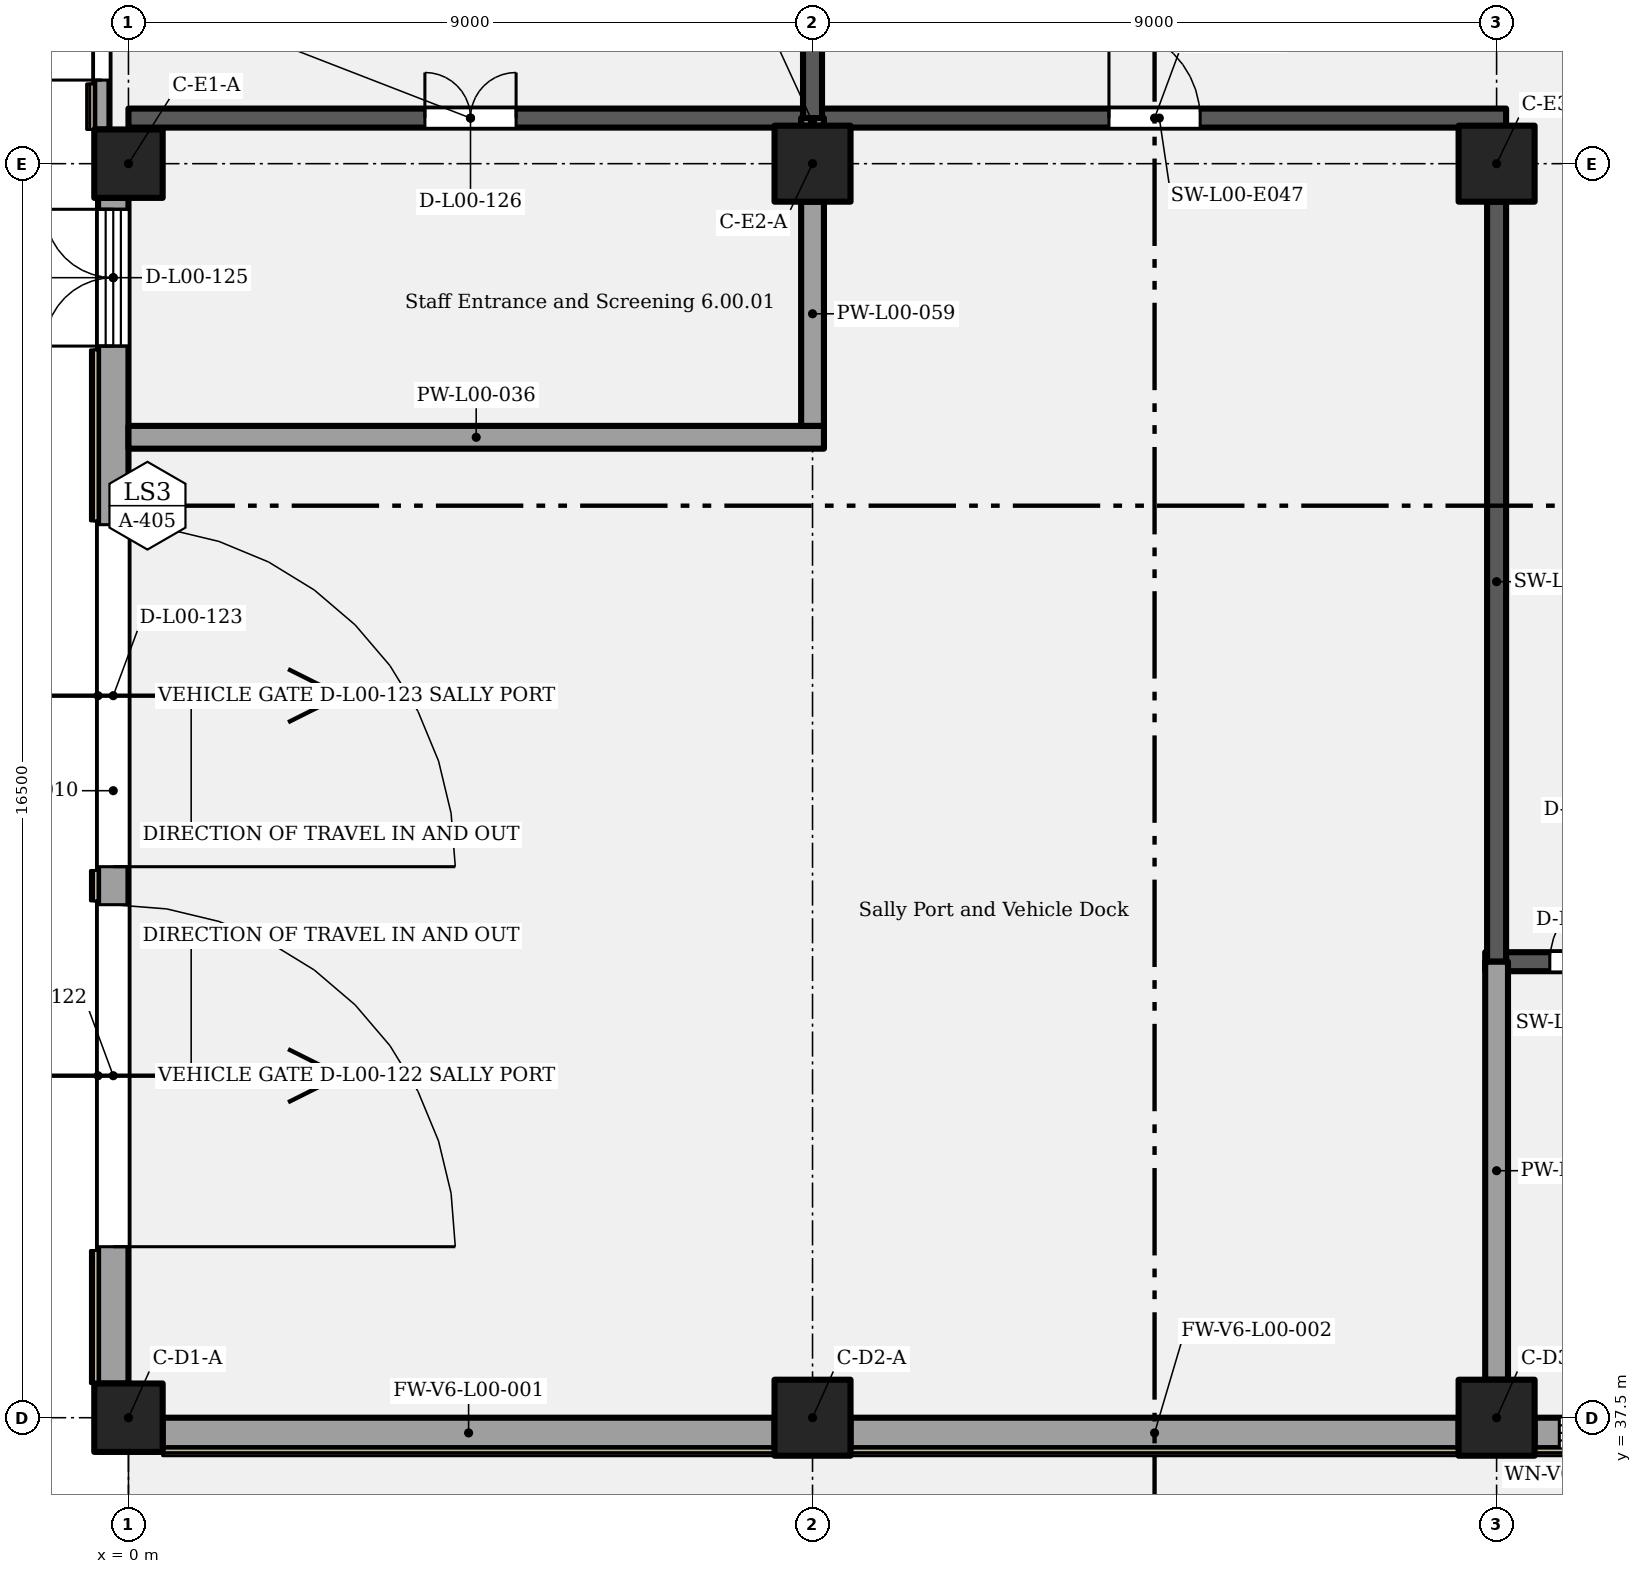
"""IFC4 building model, lengths in metres.
Left out: names, types, materials, properties, quantities, classifications, styles, units other than length and angle.
Written with IfcOpenShell. Run it as: python <this file> out.ifc"""

import sys

from ifc_helpers import new_model, si_unit, direction, frame, frame_2d, origin, origin_2d, place, context, subcontext, project, spatial, rectangle, extrude, element, fill, save


model = new_model("IFC4")
c1 = context("Model", 3, precision=1e-05, world=origin(), true_north=direction((0.0, 1.0)))
c2 = subcontext(c1, "Body", "Model", "MODEL_VIEW")
j1 = project(units=[si_unit("LENGTHUNIT", "METRE"), si_unit("PLANEANGLEUNIT", "RADIAN")], contexts=[c1])
p1 = place(None, origin())
s1 = spatial("IfcSite", under=j1, at=p1, CompositionType="ELEMENT")
p2 = place(p1, origin())
s2 = spatial("IfcBuilding", under=s1, at=p2, CompositionType="ELEMENT")
p3 = place(p2, origin())
s3 = spatial("IfcBuildingStorey", under=s2, at=p3, CompositionType="ELEMENT", Elevation=0.0)
p4 = place(p3, frame((0.0, 37.5, 0.0), z_axis=(0.0, 0.0, 1.0), x_axis=(1.0, 0.0, 0.0)))
e1 = element("IfcColumn", 1, at=p4, inside=s3, PredefinedType="COLUMN", context=c2, shape_type="SweptSolid", body=[
    extrude(rectangle(XDim=0.9, YDim=0.9, at=origin_2d()), origin(), (0.0, 0.0, 1.0), 6.6),
])
for number, where, z_axis, x_axis in (
    (2, (9.0, 37.5, 0.0), (0.0, 0.0, 1.0), (1.0, 0.0, 0.0)),
    (3, (18.0, 37.5, 0.0), (0.0, 0.0, 1.0), (1.0, 0.0, 0.0)),
):
    element("IfcColumn", number, at=place(p3, frame(where, z_axis=z_axis, x_axis=x_axis)), inside=s3, PredefinedType="COLUMN", context=c2, shape_type="SweptSolid", body=[
        extrude(rectangle(XDim=1.0, YDim=1.0, at=origin_2d()), origin(), (0.0, 0.0, 1.0), 6.6),
    ])
p5 = place(p3, frame((0.0, 54.0, 0.0), z_axis=(0.0, 0.0, 1.0), x_axis=(1.0, 0.0, 0.0)))
e4 = element("IfcColumn", 4, at=p5, inside=s3, PredefinedType="COLUMN", context=c2, shape_type="SweptSolid", body=[
    extrude(rectangle(XDim=0.9, YDim=0.9, at=origin_2d()), origin(), (0.0, 0.0, 1.0), 6.6),
])
for number, where, z_axis, x_axis in (
    (5, (9.0, 54.0, 0.0), (0.0, 0.0, 1.0), (1.0, 0.0, 0.0)),
    (6, (18.0, 54.0, 0.0), (0.0, 0.0, 1.0), (1.0, 0.0, 0.0)),
):
    element("IfcColumn", number, at=place(p3, frame(where, z_axis=z_axis, x_axis=x_axis)), inside=s3, PredefinedType="COLUMN", context=c2, shape_type="SweptSolid", body=[
        extrude(rectangle(XDim=1.0, YDim=1.0, at=origin_2d()), origin(), (0.0, 0.0, 1.0), 6.6),
    ])
p6 = place(p3, frame((0.45, 37.3, 0.0), z_axis=(0.0, 0.0, 1.0), x_axis=(1.0, 0.0, 0.0)))
e7 = element("IfcWall", 7, at=p6, inside=s3, PredefinedType="SOLIDWALL", context=c2, shape_type="SweptSolid", body=[
    extrude(rectangle(XDim=8.05, YDim=0.4, at=frame_2d((4.025, 0.0))), origin(), (0.0, 0.0, 1.0), 6.3),
])
p7 = place(p3, frame((9.5, 37.3, 0.0), z_axis=(0.0, 0.0, 1.0), x_axis=(1.0, 0.0, 0.0)))
e8 = element("IfcWall", 8, at=p7, inside=s3, PredefinedType="SOLIDWALL", context=c2, shape_type="SweptSolid", body=[
    extrude(rectangle(XDim=8.0, YDim=0.4, at=frame_2d((4.0, 0.0))), origin(), (0.0, 0.0, 1.0), 6.3),
])
p8 = place(p3, frame((18.5, 37.3, 0.0), z_axis=(0.0, 0.0, 1.0), x_axis=(1.0, 0.0, 0.0)))
e9 = element("IfcWall", 9, at=p8, inside=s3, PredefinedType="SOLIDWALL", context=c2, shape_type="SweptSolid", body=[
    extrude(rectangle(XDim=8.0, YDim=0.4, at=frame_2d((4.0, 0.0))), origin(), (0.0, 0.0, 1.0), 6.3),
])
p9 = place(p8, frame((0.325, 0.0, 1.5)))
e10 = element("IfcOpeningElement", 10, at=p9, cuts=e9, PredefinedType="OPENING", context=c2, shape_type="SweptSolid", body=[
    extrude(rectangle(XDim=0.6, YDim=3.0, at=frame_2d((0.3, 1.5))), frame((0.0, 0.21, 0.0), z_axis=(0.0, -1.0, 0.0), x_axis=(1.0, 0.0, 0.0)), (0.0, 0.0, 1.0), 0.42),
])
p10 = place(p8, frame((2.575, 0.0, 1.5)))
e11 = element("IfcOpeningElement", 11, at=p10, cuts=e9, PredefinedType="OPENING", context=c2, shape_type="SweptSolid", body=[
    extrude(rectangle(XDim=0.6, YDim=3.0, at=frame_2d((0.3, 1.5))), frame((0.0, 0.21, 0.0), z_axis=(0.0, -1.0, 0.0), x_axis=(1.0, 0.0, 0.0)), (0.0, 0.0, 1.0), 0.42),
])
p11 = place(p8, frame((4.825, 0.0, 1.5)))
e12 = element("IfcOpeningElement", 12, at=p11, cuts=e9, PredefinedType="OPENING", context=c2, shape_type="SweptSolid", body=[
    extrude(rectangle(XDim=0.6, YDim=3.0, at=frame_2d((0.3, 1.5))), frame((0.0, 0.21, 0.0), z_axis=(0.0, -1.0, 0.0), x_axis=(1.0, 0.0, 0.0)), (0.0, 0.0, 1.0), 0.42),
])
p12 = place(p8, frame((7.075, 0.0, 1.5)))
e13 = element("IfcOpeningElement", 13, at=p12, cuts=e9, PredefinedType="OPENING", context=c2, shape_type="SweptSolid", body=[
    extrude(rectangle(XDim=0.6, YDim=3.0, at=frame_2d((0.3, 1.5))), frame((0.0, 0.21, 0.0), z_axis=(0.0, -1.0, 0.0), x_axis=(1.0, 0.0, 0.0)), (0.0, 0.0, 1.0), 0.42),
])
p13 = place(p3, frame((-0.2, 37.95, 0.0), z_axis=(0.0, 0.0, 1.0), x_axis=(0.0, 1.0, 0.0)))
e14 = element("IfcWall", 14, at=p13, inside=s3, PredefinedType="SOLIDWALL", context=c2, shape_type="SweptSolid", body=[
    extrude(rectangle(XDim=15.6, YDim=0.4, at=frame_2d((7.8, 0.0))), origin(), (0.0, 0.0, 1.0), 6.3),
])
p14 = place(p13, frame((1.8, 0.0, 0.0)))
e15 = element("IfcOpeningElement", 15, at=p14, cuts=e14, PredefinedType="OPENING", context=c2, shape_type="SweptSolid", body=[
    extrude(rectangle(XDim=4.5, YDim=2.1, at=frame_2d((2.25, 1.05))), frame((0.0, 0.21, 0.0), z_axis=(0.0, -1.0, 0.0), x_axis=(1.0, 0.0, 0.0)), (0.0, 0.0, 1.0), 0.42),
])
p15 = place(p13, frame((6.8, 0.0, 0.0)))
e16 = element("IfcOpeningElement", 16, at=p15, cuts=e14, PredefinedType="OPENING", context=c2, shape_type="SweptSolid", body=[
    extrude(rectangle(XDim=4.5, YDim=2.1, at=frame_2d((2.25, 1.05))), frame((0.0, 0.21, 0.0), z_axis=(0.0, -1.0, 0.0), x_axis=(1.0, 0.0, 0.0)), (0.0, 0.0, 1.0), 0.42),
])
p16 = place(p13, frame((13.65, 0.0, 0.0)))
e17 = element("IfcOpeningElement", 17, at=p16, cuts=e14, PredefinedType="OPENING", context=c2, shape_type="SweptSolid", body=[
    extrude(rectangle(XDim=1.8, YDim=2.1, at=frame_2d((0.9, 1.05))), frame((0.0, 0.21, 0.0), z_axis=(0.0, -1.0, 0.0), x_axis=(1.0, 0.0, 0.0)), (0.0, 0.0, 1.0), 0.42),
])
p17 = place(p13, frame((13.65, 0.0, 2.25)))
e18 = element("IfcOpeningElement", 18, at=p17, cuts=e14, PredefinedType="OPENING", context=c2, shape_type="SweptSolid", body=[
    extrude(rectangle(XDim=1.8, YDim=0.8, at=frame_2d((0.9, 0.4))), frame((0.0, 0.21, 0.0), z_axis=(0.0, -1.0, 0.0), x_axis=(1.0, 0.0, 0.0)), (0.0, 0.0, 1.0), 0.42),
])
p18 = place(p3, frame((-0.35, 54.45, 0.0), z_axis=(0.0, 0.0, 1.0), x_axis=(0.0, 1.0, 0.0)))
e19 = element("IfcWall", 19, at=p18, inside=s3, PredefinedType="SOLIDWALL", context=c2, shape_type="SweptSolid", body=[
    extrude(rectangle(XDim=11.1, YDim=0.2, at=frame_2d((5.55, 0.0))), origin(), (0.0, 0.0, 1.0), 6.3),
])
p19 = place(p18, frame((0.65, 0.0, 0.0)))
e20 = element("IfcOpeningElement", 20, at=p19, cuts=e19, PredefinedType="OPENING", context=c2, shape_type="SweptSolid", body=[
    extrude(rectangle(XDim=1.4, YDim=2.1, at=frame_2d((0.7, 1.05))), frame((0.0, 0.11, 0.0), z_axis=(0.0, -1.0, 0.0), x_axis=(1.0, 0.0, 0.0)), (0.0, 0.0, 1.0), 0.22),
])
p20 = place(p3, frame((17.85, 43.5, 0.0), z_axis=(0.0, 0.0, 1.0), x_axis=(1.0, 0.0, 0.0)))
e21 = element("IfcWall", 21, at=p20, inside=s3, PredefinedType="SHEAR", context=c2, shape_type="SweptSolid", body=[
    extrude(rectangle(XDim=2.55, YDim=0.25, at=frame_2d((1.275, 0.0))), origin(), (0.0, 0.0, 1.0), 6.3),
])
p21 = place(p20, frame((0.85, 0.0, 0.0)))
e22 = element("IfcOpeningElement", 22, at=p21, cuts=e21, PredefinedType="OPENING", context=c2, shape_type="SweptSolid", body=[
    extrude(rectangle(XDim=1.0, YDim=2.1, at=frame_2d((0.5, 1.05))), frame((0.0, 0.135, 0.0), z_axis=(0.0, -1.0, 0.0), x_axis=(1.0, 0.0, 0.0)), (0.0, 0.0, 1.0), 0.27),
])
p22 = place(p3, frame((0.0, 50.4, 0.0), z_axis=(0.0, 0.0, 1.0), x_axis=(1.0, 0.0, 0.0)))
e23 = element("IfcWall", 23, at=p22, inside=s3, PredefinedType="PARTITIONING", context=c2, shape_type="SweptSolid", body=[
    extrude(rectangle(XDim=9.15, YDim=0.3, at=frame_2d((4.575, 0.0))), origin(), (0.0, 0.0, 1.0), 6.3),
])
p23 = place(p3, frame((0.0, 54.6, 0.0), z_axis=(0.0, 0.0, 1.0), x_axis=(1.0, 0.0, 0.0)))
e24 = element("IfcWall", 24, at=p23, inside=s3, PredefinedType="SHEAR", context=c2, shape_type="SweptSolid", body=[
    extrude(rectangle(XDim=9.0, YDim=0.25, at=frame_2d((4.5, 0.0))), origin(), (0.0, 0.0, 1.0), 6.3),
])
p24 = place(p23, frame((3.9, 0.0, 0.0)))
e25 = element("IfcOpeningElement", 25, at=p24, cuts=e24, PredefinedType="OPENING", context=c2, shape_type="SweptSolid", body=[
    extrude(rectangle(XDim=1.2, YDim=2.1, at=frame_2d((0.6, 1.05))), frame((0.0, 0.135, 0.0), z_axis=(0.0, -1.0, 0.0), x_axis=(1.0, 0.0, 0.0)), (0.0, 0.0, 1.0), 0.27),
])
p25 = place(p3, frame((9.0, 54.6, 0.0), z_axis=(0.0, 0.0, 1.0), x_axis=(1.0, 0.0, 0.0)))
e26 = element("IfcWall", 26, at=p25, inside=s3, PredefinedType="SHEAR", context=c2, shape_type="SweptSolid", body=[
    extrude(rectangle(XDim=9.125, YDim=0.25, at=frame_2d((4.562, 0.0))), origin(), (0.0, 0.0, 1.0), 6.3),
])
p26 = place(p25, frame((3.9, 0.0, 0.0)))
e27 = element("IfcOpeningElement", 27, at=p26, cuts=e26, PredefinedType="OPENING", context=c2, shape_type="SweptSolid", body=[
    extrude(rectangle(XDim=1.2, YDim=2.1, at=frame_2d((0.6, 1.05))), frame((0.0, 0.135, 0.0), z_axis=(0.0, -1.0, 0.0), x_axis=(1.0, 0.0, 0.0)), (0.0, 0.0, 1.0), 0.27),
])
p27 = place(p3, frame((9.0, 50.55, 0.0), z_axis=(0.0, 0.0, 1.0), x_axis=(0.0, 1.0, 0.0)))
e28 = element("IfcWall", 28, at=p27, inside=s3, PredefinedType="PARTITIONING", context=c2, shape_type="SweptSolid", body=[
    extrude(rectangle(XDim=2.95, YDim=0.3, at=frame_2d((1.475, 0.0))), origin(), (0.0, 0.0, 1.0), 5.35),
])
p28 = place(p3, frame((9.0, 54.5, 0.0), z_axis=(0.0, 0.0, 1.0), x_axis=(0.0, 1.0, 0.0)))
e29 = element("IfcWall", 29, at=p28, inside=s3, PredefinedType="PARTITIONING", context=c2, shape_type="SweptSolid", body=[
    extrude(rectangle(XDim=0.1, YDim=0.3, at=frame_2d((0.05, 0.0))), origin(), (0.0, 0.0, 1.0), 6.3),
])
p29 = place(p3, frame((9.0, 54.6, 0.0), z_axis=(0.0, 0.0, 1.0), x_axis=(0.0, 1.0, 0.0)))
e30 = element("IfcWall", 30, at=p29, inside=s3, PredefinedType="SHEAR", context=c2, shape_type="SweptSolid", body=[
    extrude(rectangle(XDim=2.15, YDim=0.25, at=frame_2d((1.075, 0.0))), origin(), (0.0, 0.0, 1.0), 6.3),
])
p30 = place(p3, frame((18.0, 38.0, 0.0), z_axis=(0.0, 0.0, 1.0), x_axis=(0.0, 1.0, 0.0)))
e31 = element("IfcWall", 31, at=p30, inside=s3, PredefinedType="PARTITIONING", context=c2, shape_type="SweptSolid", body=[
    extrude(rectangle(XDim=5.5, YDim=0.3, at=frame_2d((2.75, 0.0))), origin(), (0.0, 0.0, 1.0), 5.35),
])
p31 = place(p3, frame((18.0, 43.5, 0.0), z_axis=(0.0, 0.0, 1.0), x_axis=(0.0, 1.0, 0.0)))
e32 = element("IfcWall", 32, at=p31, inside=s3, PredefinedType="SHEAR", context=c2, shape_type="SweptSolid", body=[
    extrude(rectangle(XDim=10.0, YDim=0.25, at=frame_2d((5.0, 0.0))), origin(), (0.0, 0.0, 1.0), 6.3),
])
p32 = place(p9, origin())
e33 = element("IfcWindow", 33, at=p32, inside=s3, PartitioningType="SINGLE_PANEL", PredefinedType="WINDOW", context=c2, shape_type="SweptSolid", body=[
    extrude(rectangle(XDim=0.6, YDim=3.0, at=frame_2d((0.3, 1.5))), frame((0.0, 0.03, 0.0), z_axis=(0.0, -1.0, 0.0), x_axis=(1.0, 0.0, 0.0)), (0.0, 0.0, 1.0), 0.06),
])
fill(e10, e33)
p33 = place(p14, origin())
e34 = element("IfcDoor", 34, at=p33, inside=s3, OperationType="ROLLINGUP", PredefinedType="GATE", context=c2, shape_type="SweptSolid", body=[
    extrude(rectangle(XDim=4.5, YDim=2.1, at=frame_2d((2.25, 1.05))), frame((0.0, 0.025, 0.0), z_axis=(0.0, -1.0, 0.0), x_axis=(1.0, 0.0, 0.0)), (0.0, 0.0, 1.0), 0.05),
])
fill(e15, e34)
p34 = place(p15, origin())
e35 = element("IfcDoor", 35, at=p34, inside=s3, OperationType="ROLLINGUP", PredefinedType="GATE", context=c2, shape_type="SweptSolid", body=[
    extrude(rectangle(XDim=4.5, YDim=2.1, at=frame_2d((2.25, 1.05))), frame((0.0, 0.025, 0.0), z_axis=(0.0, -1.0, 0.0), x_axis=(1.0, 0.0, 0.0)), (0.0, 0.0, 1.0), 0.05),
])
fill(e16, e35)
p35 = place(p16, origin())
e36 = element("IfcDoor", 36, at=p35, inside=s3, OperationType="DOUBLE_DOOR_SINGLE_SWING", PredefinedType="DOOR", context=c2, shape_type="SweptSolid", body=[
    extrude(rectangle(XDim=1.8, YDim=2.1, at=frame_2d((0.9, 1.05))), frame((0.0, 0.025, 0.0), z_axis=(0.0, -1.0, 0.0), x_axis=(1.0, 0.0, 0.0)), (0.0, 0.0, 1.0), 0.05),
])
fill(e17, e36)
p36 = place(p17, origin())
e37 = element("IfcWindow", 37, at=p36, inside=s3, PartitioningType="SINGLE_PANEL", PredefinedType="WINDOW", context=c2, shape_type="SweptSolid", body=[
    extrude(rectangle(XDim=1.8, YDim=0.8, at=frame_2d((0.9, 0.4))), frame((0.0, 0.03, 0.0), z_axis=(0.0, -1.0, 0.0), x_axis=(1.0, 0.0, 0.0)), (0.0, 0.0, 1.0), 0.06),
])
fill(e18, e37)
p37 = place(p19, origin())
e38 = element("IfcDoor", 38, at=p37, inside=s3, OperationType="SINGLE_SWING_RIGHT", PredefinedType="DOOR", context=c2, shape_type="SweptSolid", body=[
    extrude(rectangle(XDim=1.4, YDim=2.1, at=frame_2d((0.7, 1.05))), frame((0.0, 0.025, 0.0), z_axis=(0.0, -1.0, 0.0), x_axis=(1.0, 0.0, 0.0)), (0.0, 0.0, 1.0), 0.05),
])
fill(e20, e38)
p38 = place(p26, origin())
e39 = element("IfcDoor", 39, at=p38, inside=s3, OperationType="SINGLE_SWING_LEFT", PredefinedType="DOOR", context=c2, shape_type="SweptSolid", body=[
    extrude(rectangle(XDim=1.2, YDim=2.1, at=frame_2d((0.6, 1.05))), frame((0.0, 0.025, 0.0), z_axis=(0.0, -1.0, 0.0), x_axis=(1.0, 0.0, 0.0)), (0.0, 0.0, 1.0), 0.05),
])
fill(e27, e39)
p39 = place(p24, origin())
e40 = element("IfcDoor", 40, at=p39, inside=s3, OperationType="DOUBLE_DOOR_SINGLE_SWING", PredefinedType="DOOR", context=c2, shape_type="SweptSolid", body=[
    extrude(rectangle(XDim=1.2, YDim=2.1, at=frame_2d((0.6, 1.05))), frame((0.0, 0.025, 0.0), z_axis=(0.0, -1.0, 0.0), x_axis=(1.0, 0.0, 0.0)), (0.0, 0.0, 1.0), 0.05),
])
fill(e25, e40)
p40 = place(p21, origin())
e41 = element("IfcDoor", 41, at=p40, inside=s3, OperationType="SINGLE_SWING_RIGHT", PredefinedType="DOOR", context=c2, shape_type="SweptSolid", body=[
    extrude(rectangle(XDim=1.0, YDim=2.1, at=frame_2d((0.5, 1.05))), frame((0.0, 0.025, 0.0), z_axis=(0.0, -1.0, 0.0), x_axis=(1.0, 0.0, 0.0)), (0.0, 0.0, 1.0), 0.05),
])
fill(e22, e41)
save(model, sys.argv[1])
